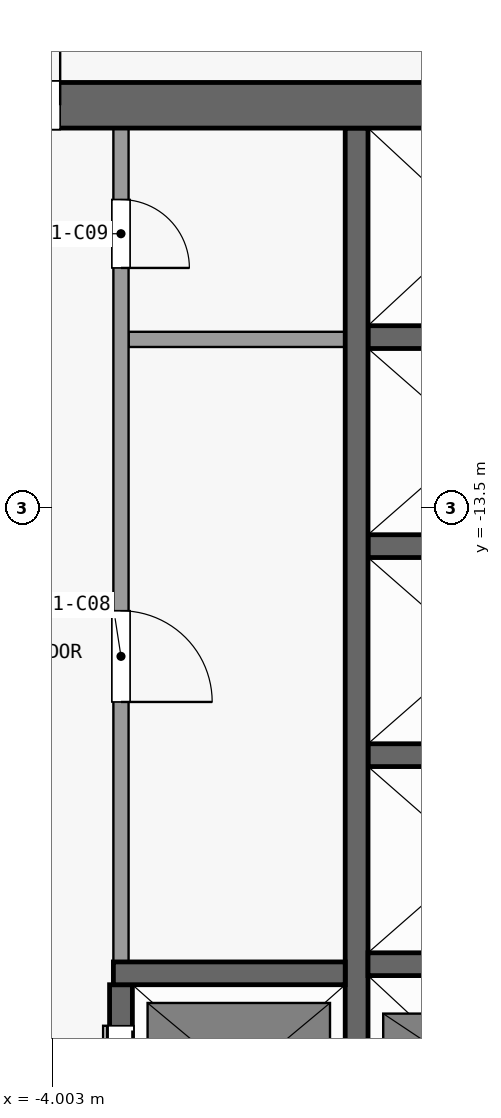
"""IFC4 building model, lengths in metres.
Left out: names, types, materials, properties, quantities, classifications, styles, units other than length and angle.
Written with IfcOpenShell. Run it as: python <this file> out.ifc"""

import sys

from ifc_helpers import new_model, si_unit, direction, frame, frame_2d, origin, place, context, subcontext, project, spatial, rectangle, extrude, element, fill, save


model = new_model("IFC4")
c1 = context("Model", 3, precision=1e-05, world=origin(), true_north=direction((0.0, 1.0)))
c2 = subcontext(c1, "Body", "Model", "MODEL_VIEW")
j1 = project(units=[si_unit("LENGTHUNIT", "METRE"), si_unit("PLANEANGLEUNIT", "RADIAN")], contexts=[c1])
p1 = place(None, origin())
s1 = spatial("IfcSite", under=j1, at=p1, CompositionType="ELEMENT")
p2 = place(p1, origin())
s2 = spatial("IfcBuilding", under=s1, at=p2, CompositionType="ELEMENT")
p3 = place(p2, frame((0.0, 0.0, 205.1)))
s3 = spatial("IfcBuildingStorey", under=s2, at=p3, CompositionType="ELEMENT", Elevation=205.1)
p4 = place(p3, frame((-13.2, -8.2, 0.0), z_axis=(0.0, 0.0, 1.0), x_axis=(1.0, 0.0, 0.0)))
e1 = element("IfcWall", 1, at=p4, inside=s3, PredefinedType="SHEAR", context=c2, shape_type="SweptSolid", body=[
    extrude(rectangle(XDim=26.4, YDim=0.6, at=frame_2d((13.2, 0.0))), origin(), (0.0, 0.0, 1.0), 3.3),
])
p5 = place(p4, frame((7.5, 0.0, 0.0)))
e2 = element("IfcOpeningElement", 2, at=p5, cuts=e1, PredefinedType="OPENING", context=c2, shape_type="SweptSolid", body=[
    extrude(rectangle(XDim=1.8, YDim=2.1, at=frame_2d((0.9, 1.05))), frame((0.0, 0.31, 0.0), z_axis=(0.0, -1.0, 0.0), x_axis=(1.0, 0.0, 0.0)), (0.0, 0.0, 1.0), 0.62),
])
p6 = place(p4, frame((17.1, 0.0, 0.0)))
e3 = element("IfcOpeningElement", 3, at=p6, cuts=e1, PredefinedType="OPENING", context=c2, shape_type="SweptSolid", body=[
    extrude(rectangle(XDim=1.8, YDim=2.1, at=frame_2d((0.9, 1.05))), frame((0.0, 0.31, 0.0), z_axis=(0.0, -1.0, 0.0), x_axis=(1.0, 0.0, 0.0)), (0.0, 0.0, 1.0), 0.62),
])
p7 = place(p4, frame((2.425, 0.0, 0.0)))
e4 = element("IfcOpeningElement", 4, at=p7, cuts=e1, PredefinedType="OPENING", context=c2, shape_type="SweptSolid", body=[
    extrude(rectangle(XDim=0.9, YDim=2.1, at=frame_2d((0.45, 1.05))), frame((0.0, 0.31, 0.0), z_axis=(0.0, -1.0, 0.0), x_axis=(1.0, 0.0, 0.0)), (0.0, 0.0, 1.0), 0.62),
])
p8 = place(p4, frame((23.775, 0.0, 0.0)))
e5 = element("IfcOpeningElement", 5, at=p8, cuts=e1, PredefinedType="OPENING", context=c2, shape_type="SweptSolid", body=[
    extrude(rectangle(XDim=1.2, YDim=2.1, at=frame_2d((0.6, 1.05))), frame((0.0, 0.31, 0.0), z_axis=(0.0, -1.0, 0.0), x_axis=(1.0, 0.0, 0.0)), (0.0, 0.0, 1.0), 0.62),
])
p9 = place(p3, frame((-3.2, -19.62, 0.0), z_axis=(0.0, 0.0, 1.0), x_axis=(1.0, 0.0, 0.0)))
e6 = element("IfcWall", 6, at=p9, inside=s3, PredefinedType="SHEAR", context=c2, shape_type="SweptSolid", body=[
    extrude(rectangle(XDim=3.05, YDim=0.3, at=frame_2d((1.525, 0.0))), origin(), (0.0, 0.0, 1.0), 3.3),
])
for number, where, z_axis, x_axis in (
    (7, (0.15, -19.5, 0.0), (0.0, 0.0, 1.0), (1.0, 0.0, 0.0)),
    (8, (0.15, -16.75, 0.0), (0.0, 0.0, 1.0), (1.0, 0.0, 0.0)),
    (9, (0.15, -14.0, 0.0), (0.0, 0.0, 1.0), (1.0, 0.0, 0.0)),
):
    element("IfcWall", number, at=place(p3, frame(where, z_axis=z_axis, x_axis=x_axis)), inside=s3, PredefinedType="SHEAR", context=c2, shape_type="SweptSolid", body=[
        extrude(rectangle(XDim=2.8, YDim=0.3, at=frame_2d((1.4, 0.0))), origin(), (0.0, 0.0, 1.0), 3.3),
    ])
p10 = place(p3, frame((-3.0, -11.28, 0.0), z_axis=(0.0, 0.0, 1.0), x_axis=(1.0, 0.0, 0.0)))
e10 = element("IfcWall", 10, at=p10, inside=s3, PredefinedType="PARTITIONING", context=c2, shape_type="SweptSolid", body=[
    extrude(rectangle(XDim=2.85, YDim=0.2, at=frame_2d((1.425, 0.0))), origin(), (0.0, 0.0, 1.0), 3.3),
])
p11 = place(p3, frame((0.15, -11.25, 0.0), z_axis=(0.0, 0.0, 1.0), x_axis=(1.0, 0.0, 0.0)))
e11 = element("IfcWall", 11, at=p11, inside=s3, PredefinedType="SHEAR", context=c2, shape_type="SweptSolid", body=[
    extrude(rectangle(XDim=2.8, YDim=0.3, at=frame_2d((1.4, 0.0))), origin(), (0.0, 0.0, 1.0), 3.3),
])
p12 = place(p3, frame((-3.1, -22.25, 0.0), z_axis=(0.0, 0.0, 1.0), x_axis=(0.0, 1.0, 0.0)))
e12 = element("IfcWall", 12, at=p12, inside=s3, PredefinedType="SHEAR", context=c2, shape_type="SweptSolid", body=[
    extrude(rectangle(XDim=2.48, YDim=0.3, at=frame_2d((1.24, 0.0))), origin(), (0.0, 0.0, 1.0), 3.3),
])
p13 = place(p12, frame((0.54, 0.0, 0.0)))
e13 = element("IfcOpeningElement", 13, at=p13, cuts=e12, PredefinedType="OPENING", context=c2, shape_type="SweptSolid", body=[
    extrude(rectangle(XDim=1.4, YDim=2.1, at=frame_2d((0.7, 1.05))), frame((0.0, 0.16, 0.0), z_axis=(0.0, -1.0, 0.0), x_axis=(1.0, 0.0, 0.0)), (0.0, 0.0, 1.0), 0.32),
])
p14 = place(p3, frame((-3.1, -8.5, 0.0), z_axis=(0.0, 0.0, 1.0), x_axis=(0.0, -1.0, 0.0)))
e14 = element("IfcWall", 14, at=p14, inside=s3, PredefinedType="PARTITIONING", context=c2, shape_type="SweptSolid", body=[
    extrude(rectangle(XDim=10.97, YDim=0.2, at=frame_2d((5.485, 0.0))), origin(), (0.0, 0.0, 1.0), 3.3),
])
p15 = place(p14, frame((6.35, 0.0, 0.0)))
e15 = element("IfcOpeningElement", 15, at=p15, cuts=e14, PredefinedType="OPENING", context=c2, shape_type="SweptSolid", body=[
    extrude(rectangle(XDim=1.2, YDim=2.1, at=frame_2d((0.6, 1.05))), frame((0.0, 0.11, 0.0), z_axis=(0.0, -1.0, 0.0), x_axis=(1.0, 0.0, 0.0)), (0.0, 0.0, 1.0), 0.22),
])
p16 = place(p14, frame((0.94, 0.0, 0.0)))
e16 = element("IfcOpeningElement", 16, at=p16, cuts=e14, PredefinedType="OPENING", context=c2, shape_type="SweptSolid", body=[
    extrude(rectangle(XDim=0.9, YDim=2.1, at=frame_2d((0.45, 1.05))), frame((0.0, 0.11, 0.0), z_axis=(0.0, -1.0, 0.0), x_axis=(1.0, 0.0, 0.0)), (0.0, 0.0, 1.0), 0.22),
])
p17 = place(p3, frame((0.0, -22.25, 0.0), z_axis=(0.0, 0.0, 1.0), x_axis=(0.0, 1.0, 0.0)))
e17 = element("IfcWall", 17, at=p17, inside=s3, PredefinedType="SHEAR", context=c2, shape_type="SweptSolid", body=[
    extrude(rectangle(XDim=13.75, YDim=0.3, at=frame_2d((6.875, 0.0))), origin(), (0.0, 0.0, 1.0), 3.3),
])
p18 = place(p13, origin())
e18 = element("IfcDoor", 18, at=p18, inside=s3, OperationType="DOUBLE_DOOR_SLIDING", PredefinedType="DOOR", context=c2, shape_type="SweptSolid", body=[
    extrude(rectangle(XDim=1.4, YDim=2.1, at=frame_2d((0.7, 1.05))), frame((0.0, 0.025, 0.0), z_axis=(0.0, -1.0, 0.0), x_axis=(1.0, 0.0, 0.0)), (0.0, 0.0, 1.0), 0.05),
])
fill(e13, e18)
p19 = place(p5, origin())
e19 = element("IfcDoor", 19, at=p19, inside=s3, OperationType="DOUBLE_DOOR_SINGLE_SWING", PredefinedType="DOOR", context=c2, shape_type="SweptSolid", body=[
    extrude(rectangle(XDim=1.8, YDim=2.1, at=frame_2d((0.9, 1.05))), frame((0.0, 0.025, 0.0), z_axis=(0.0, -1.0, 0.0), x_axis=(1.0, 0.0, 0.0)), (0.0, 0.0, 1.0), 0.05),
])
fill(e2, e19)
p20 = place(p15, origin())
e20 = element("IfcDoor", 20, at=p20, inside=s3, OperationType="SINGLE_SWING_RIGHT", PredefinedType="DOOR", context=c2, shape_type="SweptSolid", body=[
    extrude(rectangle(XDim=1.2, YDim=2.1, at=frame_2d((0.6, 1.05))), frame((0.0, 0.025, 0.0), z_axis=(0.0, -1.0, 0.0), x_axis=(1.0, 0.0, 0.0)), (0.0, 0.0, 1.0), 0.05),
])
fill(e15, e20)
p21 = place(p16, origin())
e21 = element("IfcDoor", 21, at=p21, inside=s3, OperationType="SINGLE_SWING_RIGHT", PredefinedType="DOOR", context=c2, shape_type="SweptSolid", body=[
    extrude(rectangle(XDim=0.9, YDim=2.1, at=frame_2d((0.45, 1.05))), frame((0.0, 0.025, 0.0), z_axis=(0.0, -1.0, 0.0), x_axis=(1.0, 0.0, 0.0)), (0.0, 0.0, 1.0), 0.05),
])
fill(e16, e21)
save(model, sys.argv[1])
